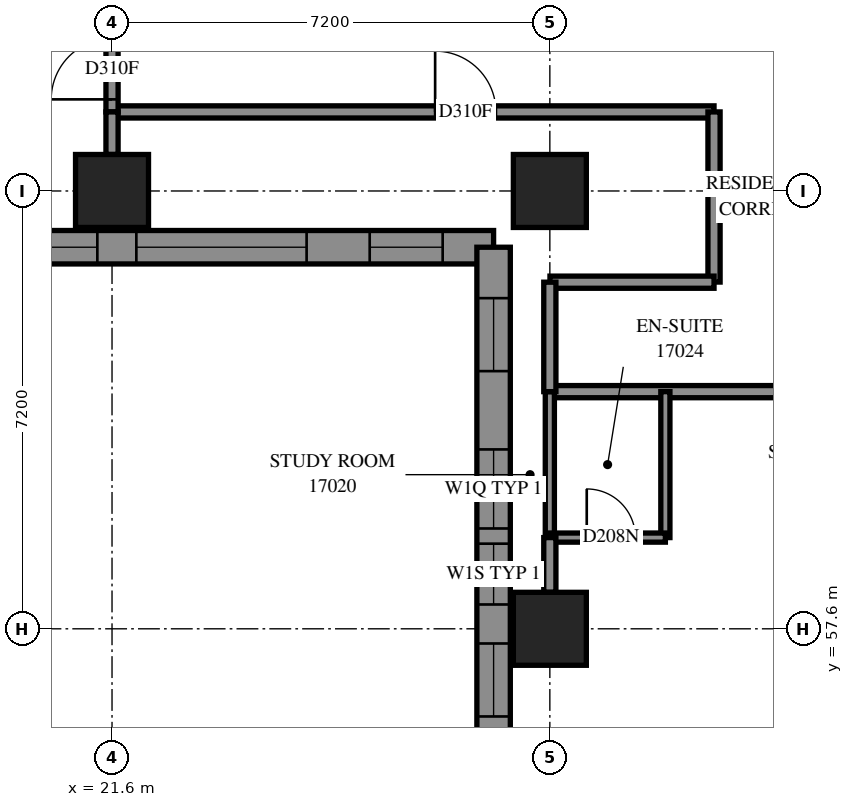
"""IFC4 building model, lengths in metres.
Left out: names, types, materials, properties, quantities, classifications, styles, units other than length and angle.
Written with IfcOpenShell. Run it as: python <this file> out.ifc"""

import sys

from ifc_helpers import new_model, si_unit, direction, frame, frame_2d, origin, origin_2d, place, context, subcontext, project, spatial, polyline, rectangle, outline, extrude, element, fill, save


model = new_model("IFC4")
c1 = context("Model", 3, precision=1e-05, world=origin(), true_north=direction((0.0, 1.0)))
c2 = subcontext(c1, "Body", "Model", "MODEL_VIEW")
j1 = project(units=[si_unit("LENGTHUNIT", "METRE"), si_unit("PLANEANGLEUNIT", "RADIAN")], contexts=[c1])
p1 = place(None, origin())
s1 = spatial("IfcSite", under=j1, at=p1, CompositionType="ELEMENT")
p2 = place(p1, origin())
s2 = spatial("IfcBuilding", under=s1, at=p2, CompositionType="ELEMENT")
p3 = place(p2, frame((0.0, 0.0, 64.4)))
s3 = spatial("IfcBuildingStorey", under=s2, at=p3, CompositionType="ELEMENT", Elevation=64.4)
for number, where, z_axis, x_axis in (
    (1, (21.6, 64.8, 0.0), (0.0, 0.0, 1.0), (1.0, 0.0, 0.0)),
    (2, (28.8, 57.6, 0.0), (0.0, 0.0, 1.0), (1.0, 0.0, 0.0)),
    (3, (28.8, 64.8, 0.0), (0.0, 0.0, 1.0), (1.0, 0.0, 0.0)),
):
    element("IfcColumn", number, at=place(p3, frame(where, z_axis=z_axis, x_axis=x_axis)), inside=s3, PredefinedType="COLUMN", context=c2, shape_type="SweptSolid", body=[
        extrude(rectangle(XDim=1.2, YDim=1.2, at=origin_2d()), origin(), (0.0, 0.0, 1.0), 3.1),
    ])
p4 = place(p3, frame((19.442, 63.875, 0.0), z_axis=(0.0, 0.0, 1.0), x_axis=(1.0, 0.0, 0.0)))
e4 = element("IfcWall", 4, at=p4, inside=s3, PredefinedType="SOLIDWALL", context=c2, shape_type="SweptSolid", body=[
    extrude(outline(polyline([(-0.275, -0.275), (8.158, -0.275), (8.708, 0.275), (0.275, 0.275), (-0.275, -0.275)])), origin(), (0.0, 0.0, 1.0), 3.1),
])
p5 = place(p4, frame((2.558, 0.0, 0.5)))
e5 = element("IfcOpeningElement", 5, at=p5, cuts=e4, PredefinedType="OPENING", context=c2, shape_type="SweptSolid", body=[
    extrude(rectangle(XDim=2.8, YDim=2.45, at=frame_2d((1.4, 1.225))), frame((0.0, 0.285, 0.0), z_axis=(0.0, -1.0, 0.0), x_axis=(1.0, 0.0, 0.0)), (0.0, 0.0, 1.0), 0.57),
])
p6 = place(p4, frame((0.717, 0.0, 0.5)))
e6 = element("IfcOpeningElement", 6, at=p6, cuts=e4, PredefinedType="OPENING", context=c2, shape_type="SweptSolid", body=[
    extrude(rectangle(XDim=1.2, YDim=2.45, at=frame_2d((0.6, 1.225))), frame((0.0, 0.285, 0.0), z_axis=(0.0, -1.0, 0.0), x_axis=(1.0, 0.0, 0.0)), (0.0, 0.0, 1.0), 0.57),
])
p7 = place(p4, frame((6.396, 0.0, 0.5)))
e7 = element("IfcOpeningElement", 7, at=p7, cuts=e4, PredefinedType="OPENING", context=c2, shape_type="SweptSolid", body=[
    extrude(rectangle(XDim=1.2, YDim=2.45, at=frame_2d((0.6, 1.225))), frame((0.0, 0.285, 0.0), z_axis=(0.0, -1.0, 0.0), x_axis=(1.0, 0.0, 0.0)), (0.0, 0.0, 1.0), 0.57),
])
p8 = place(p3, frame((27.875, 63.875, 0.0), z_axis=(0.0, 0.0, 1.0), x_axis=(0.0, -1.0, 0.0)))
e8 = element("IfcWall", 8, at=p8, inside=s3, PredefinedType="SOLIDWALL", context=c2, shape_type="SweptSolid", body=[
    extrude(outline(polyline([(0.275, -0.275), (8.708, -0.275), (8.158, 0.275), (-0.275, 0.275), (0.275, -0.275)])), origin(), (0.0, 0.0, 1.0), 3.1),
])
p9 = place(p8, frame((0.838, 0.0, 0.5)))
e9 = element("IfcOpeningElement", 9, at=p9, cuts=e8, PredefinedType="OPENING", context=c2, shape_type="SweptSolid", body=[
    extrude(rectangle(XDim=1.2, YDim=2.45, at=frame_2d((0.6, 1.225))), frame((0.0, 0.285, 0.0), z_axis=(0.0, -1.0, 0.0), x_axis=(1.0, 0.0, 0.0)), (0.0, 0.0, 1.0), 0.57),
])
p10 = place(p8, frame((6.516, 0.0, 0.5)))
e10 = element("IfcOpeningElement", 10, at=p10, cuts=e8, PredefinedType="OPENING", context=c2, shape_type="SweptSolid", body=[
    extrude(rectangle(XDim=1.2, YDim=2.45, at=frame_2d((0.6, 1.225))), frame((0.0, 0.285, 0.0), z_axis=(0.0, -1.0, 0.0), x_axis=(1.0, 0.0, 0.0)), (0.0, 0.0, 1.0), 0.57),
])
p11 = place(p8, frame((3.325, 0.0, 0.45)))
e11 = element("IfcOpeningElement", 11, at=p11, cuts=e8, PredefinedType="OPENING", context=c2, shape_type="SweptSolid", body=[
    extrude(rectangle(XDim=1.3, YDim=2.5, at=frame_2d((0.65, 1.25))), frame((0.0, 0.285, 0.0), z_axis=(0.0, -1.0, 0.0), x_axis=(1.0, 0.0, 0.0)), (0.0, 0.0, 1.0), 0.57),
])
p12 = place(p8, frame((4.875, 0.0, 0.45)))
e12 = element("IfcOpeningElement", 12, at=p12, cuts=e8, PredefinedType="OPENING", context=c2, shape_type="SweptSolid", body=[
    extrude(rectangle(XDim=1.0, YDim=2.5, at=frame_2d((0.5, 1.25))), frame((0.0, 0.285, 0.0), z_axis=(0.0, -1.0, 0.0), x_axis=(1.0, 0.0, 0.0)), (0.0, 0.0, 1.0), 0.57),
])
p13 = place(p3, frame((28.8, 61.5, 0.0), z_axis=(0.0, 0.0, 1.0), x_axis=(1.0, 0.0, 0.0)))
e13 = element("IfcWall", 13, at=p13, inside=s3, PredefinedType="PARTITIONING", context=c2, shape_type="SweptSolid", body=[
    extrude(rectangle(XDim=24.3, YDim=0.2, at=frame_2d((12.15, 0.0))), origin(), (0.0, 0.0, 1.0), 3.1),
])
p14 = place(p13, frame((3.899, 0.0, 0.0)))
e14 = element("IfcOpeningElement", 14, at=p14, cuts=e13, PredefinedType="OPENING", context=c2, shape_type="SweptSolid", body=[
    extrude(rectangle(XDim=0.9, YDim=2.1, at=frame_2d((0.45, 1.05))), frame((0.0, 0.11, 0.0), z_axis=(0.0, -1.0, 0.0), x_axis=(1.0, 0.0, 0.0)), (0.0, 0.0, 1.0), 0.22),
])
p15 = place(p13, frame((9.5, 0.0, 0.0)))
e15 = element("IfcOpeningElement", 15, at=p15, cuts=e13, PredefinedType="OPENING", context=c2, shape_type="SweptSolid", body=[
    extrude(rectangle(XDim=0.9, YDim=2.1, at=frame_2d((0.45, 1.05))), frame((0.0, 0.11, 0.0), z_axis=(0.0, -1.0, 0.0), x_axis=(1.0, 0.0, 0.0)), (0.0, 0.0, 1.0), 0.22),
])
p16 = place(p13, frame((11.307, 0.0, 0.0)))
e16 = element("IfcOpeningElement", 16, at=p16, cuts=e13, PredefinedType="OPENING", context=c2, shape_type="SweptSolid", body=[
    extrude(rectangle(XDim=1.0, YDim=2.1, at=frame_2d((0.5, 1.05))), frame((0.0, 0.11, 0.0), z_axis=(0.0, -1.0, 0.0), x_axis=(1.0, 0.0, 0.0)), (0.0, 0.0, 1.0), 0.22),
])
p17 = place(p13, frame((16.7, 0.0, 0.0)))
e17 = element("IfcOpeningElement", 17, at=p17, cuts=e13, PredefinedType="OPENING", context=c2, shape_type="SweptSolid", body=[
    extrude(rectangle(XDim=0.9, YDim=2.1, at=frame_2d((0.45, 1.05))), frame((0.0, 0.11, 0.0), z_axis=(0.0, -1.0, 0.0), x_axis=(1.0, 0.0, 0.0)), (0.0, 0.0, 1.0), 0.22),
])
p18 = place(p13, frame((18.508, 0.0, 0.0)))
e18 = element("IfcOpeningElement", 18, at=p18, cuts=e13, PredefinedType="OPENING", context=c2, shape_type="SweptSolid", body=[
    extrude(rectangle(XDim=1.0, YDim=2.1, at=frame_2d((0.5, 1.05))), frame((0.0, 0.11, 0.0), z_axis=(0.0, -1.0, 0.0), x_axis=(1.0, 0.0, 0.0)), (0.0, 0.0, 1.0), 0.22),
])
p19 = place(p13, frame((23.033, 0.0, 0.0)))
e19 = element("IfcOpeningElement", 19, at=p19, cuts=e13, PredefinedType="OPENING", context=c2, shape_type="SweptSolid", body=[
    extrude(rectangle(XDim=1.0, YDim=2.1, at=frame_2d((0.5, 1.05))), frame((0.0, 0.11, 0.0), z_axis=(0.0, -1.0, 0.0), x_axis=(1.0, 0.0, 0.0)), (0.0, 0.0, 1.0), 0.22),
])
p20 = place(p3, frame((21.6, 66.1, 0.0), z_axis=(0.0, 0.0, 1.0), x_axis=(1.0, 0.0, 0.0)))
e20 = element("IfcWall", 20, at=p20, inside=s3, PredefinedType="PARTITIONING", context=c2, shape_type="SweptSolid", body=[
    extrude(rectangle(XDim=9.9, YDim=0.2, at=frame_2d((4.95, 0.0))), origin(), (0.0, 0.0, 1.0), 3.1),
])
p21 = place(p20, frame((5.314, 0.0, 0.0)))
e21 = element("IfcOpeningElement", 21, at=p21, cuts=e20, PredefinedType="OPENING", context=c2, shape_type="SweptSolid", body=[
    extrude(rectangle(XDim=1.0, YDim=2.1, at=frame_2d((0.5, 1.05))), frame((0.0, 0.11, 0.0), z_axis=(0.0, -1.0, 0.0), x_axis=(1.0, 0.0, 0.0)), (0.0, 0.0, 1.0), 0.22),
])
p22 = place(p3, frame((31.5, 63.302, 0.0), z_axis=(0.0, 0.0, 1.0), x_axis=(0.0, 1.0, 0.0)))
e22 = element("IfcWall", 22, at=p22, inside=s3, PredefinedType="PARTITIONING", context=c2, shape_type="SweptSolid", body=[
    extrude(rectangle(XDim=2.798, YDim=0.2, at=frame_2d((1.399, 0.0))), origin(), (0.0, 0.0, 1.0), 3.1),
])
p23 = place(p3, frame((28.802, 63.3, 0.0), z_axis=(0.0, 0.0, 1.0), x_axis=(1.0, 0.0, 0.0)))
e23 = element("IfcWall", 23, at=p23, inside=s3, PredefinedType="PARTITIONING", context=c2, shape_type="SweptSolid", body=[
    extrude(rectangle(XDim=2.698, YDim=0.2, at=frame_2d((1.349, 0.0))), origin(), (0.0, 0.0, 1.0), 3.1),
])
p24 = place(p3, frame((30.7, 59.1, 0.0), z_axis=(0.0, 0.0, 1.0), x_axis=(0.0, 1.0, 0.0)))
e24 = element("IfcWall", 24, at=p24, inside=s3, PredefinedType="PARTITIONING", context=c2, shape_type="SweptSolid", body=[
    extrude(rectangle(XDim=2.4, YDim=0.15, at=frame_2d((1.2, 0.0))), origin(), (0.0, 0.0, 1.0), 3.1),
])
p25 = place(p3, frame((28.8, 59.1, 0.0), z_axis=(0.0, 0.0, 1.0), x_axis=(0.0, 1.0, 0.0)))
e25 = element("IfcWall", 25, at=p25, inside=s3, PredefinedType="PARTITIONING", context=c2, shape_type="SweptSolid", body=[
    extrude(rectangle(XDim=2.4, YDim=0.15, at=frame_2d((1.2, 0.0))), origin(), (0.0, 0.0, 1.0), 2.6),
])
p26 = place(p3, frame((28.8, 59.1, 0.0), z_axis=(0.0, 0.0, 1.0), x_axis=(1.0, 0.0, 0.0)))
e26 = element("IfcWall", 26, at=p26, inside=s3, PredefinedType="PARTITIONING", context=c2, shape_type="SweptSolid", body=[
    extrude(rectangle(XDim=1.9, YDim=0.15, at=frame_2d((0.95, 0.0))), origin(), (0.0, 0.0, 1.0), 3.1),
])
p27 = place(p26, frame((0.607, 0.0, 0.0)))
e27 = element("IfcOpeningElement", 27, at=p27, cuts=e26, PredefinedType="OPENING", context=c2, shape_type="SweptSolid", body=[
    extrude(rectangle(XDim=0.8, YDim=2.1, at=frame_2d((0.4, 1.05))), frame((0.0, 0.085, 0.0), z_axis=(0.0, -1.0, 0.0), x_axis=(1.0, 0.0, 0.0)), (0.0, 0.0, 1.0), 0.17),
])
p28 = place(p3, frame((21.6, 66.1, 0.0), z_axis=(0.0, 0.0, 1.0), x_axis=(0.0, 1.0, 0.0)))
e28 = element("IfcWall", 28, at=p28, inside=s3, PredefinedType="PARTITIONING", context=c2, shape_type="SweptSolid", body=[
    extrude(rectangle(XDim=1.8, YDim=0.2, at=frame_2d((0.9, 0.0))), origin(), (0.0, 0.0, 1.0), 2.6),
])
p29 = place(p28, frame((0.207, 0.0, 0.0)))
e29 = element("IfcOpeningElement", 29, at=p29, cuts=e28, PredefinedType="OPENING", context=c2, shape_type="SweptSolid", body=[
    extrude(rectangle(XDim=1.0, YDim=2.1, at=frame_2d((0.5, 1.05))), frame((0.0, 0.11, 0.0), z_axis=(0.0, -1.0, 0.0), x_axis=(1.0, 0.0, 0.0)), (0.0, 0.0, 1.0), 0.22),
])
p30 = place(p3, frame((28.8, 61.5, 0.0), z_axis=(0.0, 0.0, 1.0), x_axis=(0.0, 1.0, 0.0)))
e30 = element("IfcWall", 30, at=p30, inside=s3, PredefinedType="PARTITIONING", context=c2, shape_type="SweptSolid", body=[
    extrude(rectangle(XDim=1.8, YDim=0.2, at=frame_2d((0.9, 0.0))), origin(), (0.0, 0.0, 1.0), 2.6),
])
p31 = place(p3, frame((28.8, 58.2, 0.0), z_axis=(0.0, 0.0, 1.0), x_axis=(0.0, 1.0, 0.0)))
e31 = element("IfcWall", 31, at=p31, inside=s3, PredefinedType="PARTITIONING", context=c2, shape_type="SweptSolid", body=[
    extrude(rectangle(XDim=0.9, YDim=0.2, at=frame_2d((0.45, 0.0))), origin(), (0.0, 0.0, 1.0), 2.6),
])
p32 = place(p3, frame((21.6, 65.4, 0.0), z_axis=(0.0, 0.0, 1.0), x_axis=(0.0, 1.0, 0.0)))
e32 = element("IfcWall", 32, at=p32, inside=s3, PredefinedType="PARTITIONING", context=c2, shape_type="SweptSolid", body=[
    extrude(rectangle(XDim=0.7, YDim=0.2, at=frame_2d((0.35, 0.0))), origin(), (0.0, 0.0, 1.0), 2.6),
])
p33 = place(p5, origin())
e33 = element("IfcWindow", 33, at=p33, inside=s3, PartitioningType="SINGLE_PANEL", PredefinedType="WINDOW", context=c2, shape_type="SweptSolid", body=[
    extrude(rectangle(XDim=2.8, YDim=2.45, at=frame_2d((1.4, 1.225))), frame((0.0, 0.155, 0.0), z_axis=(0.0, -1.0, 0.0), x_axis=(1.0, 0.0, 0.0)), (0.0, 0.0, 1.0), 0.06),
])
fill(e5, e33)
p34 = place(p6, origin())
e34 = element("IfcWindow", 34, at=p34, inside=s3, PartitioningType="SINGLE_PANEL", PredefinedType="WINDOW", context=c2, shape_type="SweptSolid", body=[
    extrude(rectangle(XDim=1.2, YDim=2.45, at=frame_2d((0.6, 1.225))), frame((0.0, 0.155, 0.0), z_axis=(0.0, -1.0, 0.0), x_axis=(1.0, 0.0, 0.0)), (0.0, 0.0, 1.0), 0.06),
])
fill(e6, e34)
p35 = place(p7, origin())
e35 = element("IfcWindow", 35, at=p35, inside=s3, PartitioningType="SINGLE_PANEL", PredefinedType="WINDOW", context=c2, shape_type="SweptSolid", body=[
    extrude(rectangle(XDim=1.2, YDim=2.45, at=frame_2d((0.6, 1.225))), frame((0.0, 0.155, 0.0), z_axis=(0.0, -1.0, 0.0), x_axis=(1.0, 0.0, 0.0)), (0.0, 0.0, 1.0), 0.06),
])
fill(e7, e35)
p36 = place(p9, origin())
e36 = element("IfcWindow", 36, at=p36, inside=s3, PartitioningType="SINGLE_PANEL", PredefinedType="WINDOW", context=c2, shape_type="SweptSolid", body=[
    extrude(rectangle(XDim=1.2, YDim=2.45, at=frame_2d((0.6, 1.225))), frame((0.0, 0.155, 0.0), z_axis=(0.0, -1.0, 0.0), x_axis=(1.0, 0.0, 0.0)), (0.0, 0.0, 1.0), 0.06),
])
fill(e9, e36)
p37 = place(p10, origin())
e37 = element("IfcWindow", 37, at=p37, inside=s3, PartitioningType="SINGLE_PANEL", PredefinedType="WINDOW", context=c2, shape_type="SweptSolid", body=[
    extrude(rectangle(XDim=1.2, YDim=2.45, at=frame_2d((0.6, 1.225))), frame((0.0, 0.155, 0.0), z_axis=(0.0, -1.0, 0.0), x_axis=(1.0, 0.0, 0.0)), (0.0, 0.0, 1.0), 0.06),
])
fill(e10, e37)
p38 = place(p29, origin())
e38 = element("IfcDoor", 38, at=p38, inside=s3, OperationType="SINGLE_SWING_RIGHT", PredefinedType="DOOR", context=c2, shape_type="SweptSolid", body=[
    extrude(rectangle(XDim=1.0, YDim=2.1, at=frame_2d((0.5, 1.05))), frame((0.0, 0.025, 0.0), z_axis=(0.0, -1.0, 0.0), x_axis=(1.0, 0.0, 0.0)), (0.0, 0.0, 1.0), 0.05),
])
fill(e29, e38)
p39 = place(p21, origin())
e39 = element("IfcDoor", 39, at=p39, inside=s3, OperationType="SINGLE_SWING_LEFT", PredefinedType="DOOR", context=c2, shape_type="SweptSolid", body=[
    extrude(rectangle(XDim=1.0, YDim=2.1, at=frame_2d((0.5, 1.05))), frame((0.0, 0.025, 0.0), z_axis=(0.0, -1.0, 0.0), x_axis=(1.0, 0.0, 0.0)), (0.0, 0.0, 1.0), 0.05),
])
fill(e21, e39)
p40 = place(p27, origin())
e40 = element("IfcDoor", 40, at=p40, inside=s3, OperationType="SINGLE_SWING_RIGHT", PredefinedType="DOOR", context=c2, shape_type="SweptSolid", body=[
    extrude(rectangle(XDim=0.8, YDim=2.1, at=frame_2d((0.4, 1.05))), frame((0.0, 0.025, 0.0), z_axis=(0.0, -1.0, 0.0), x_axis=(1.0, 0.0, 0.0)), (0.0, 0.0, 1.0), 0.05),
])
fill(e27, e40)
p41 = place(p11, origin())
e41 = element("IfcWindow", 41, at=p41, inside=s3, PartitioningType="SINGLE_PANEL", PredefinedType="WINDOW", context=c2, shape_type="SweptSolid", body=[
    extrude(rectangle(XDim=1.3, YDim=2.5, at=frame_2d((0.65, 1.25))), frame((0.0, 0.155, 0.0), z_axis=(0.0, -1.0, 0.0), x_axis=(1.0, 0.0, 0.0)), (0.0, 0.0, 1.0), 0.06),
])
fill(e11, e41)
p42 = place(p12, origin())
e42 = element("IfcWindow", 42, at=p42, inside=s3, PartitioningType="SINGLE_PANEL", PredefinedType="WINDOW", context=c2, shape_type="SweptSolid", body=[
    extrude(rectangle(XDim=1.0, YDim=2.5, at=frame_2d((0.5, 1.25))), frame((0.0, 0.155, 0.0), z_axis=(0.0, -1.0, 0.0), x_axis=(1.0, 0.0, 0.0)), (0.0, 0.0, 1.0), 0.06),
])
fill(e12, e42)
save(model, sys.argv[1])
